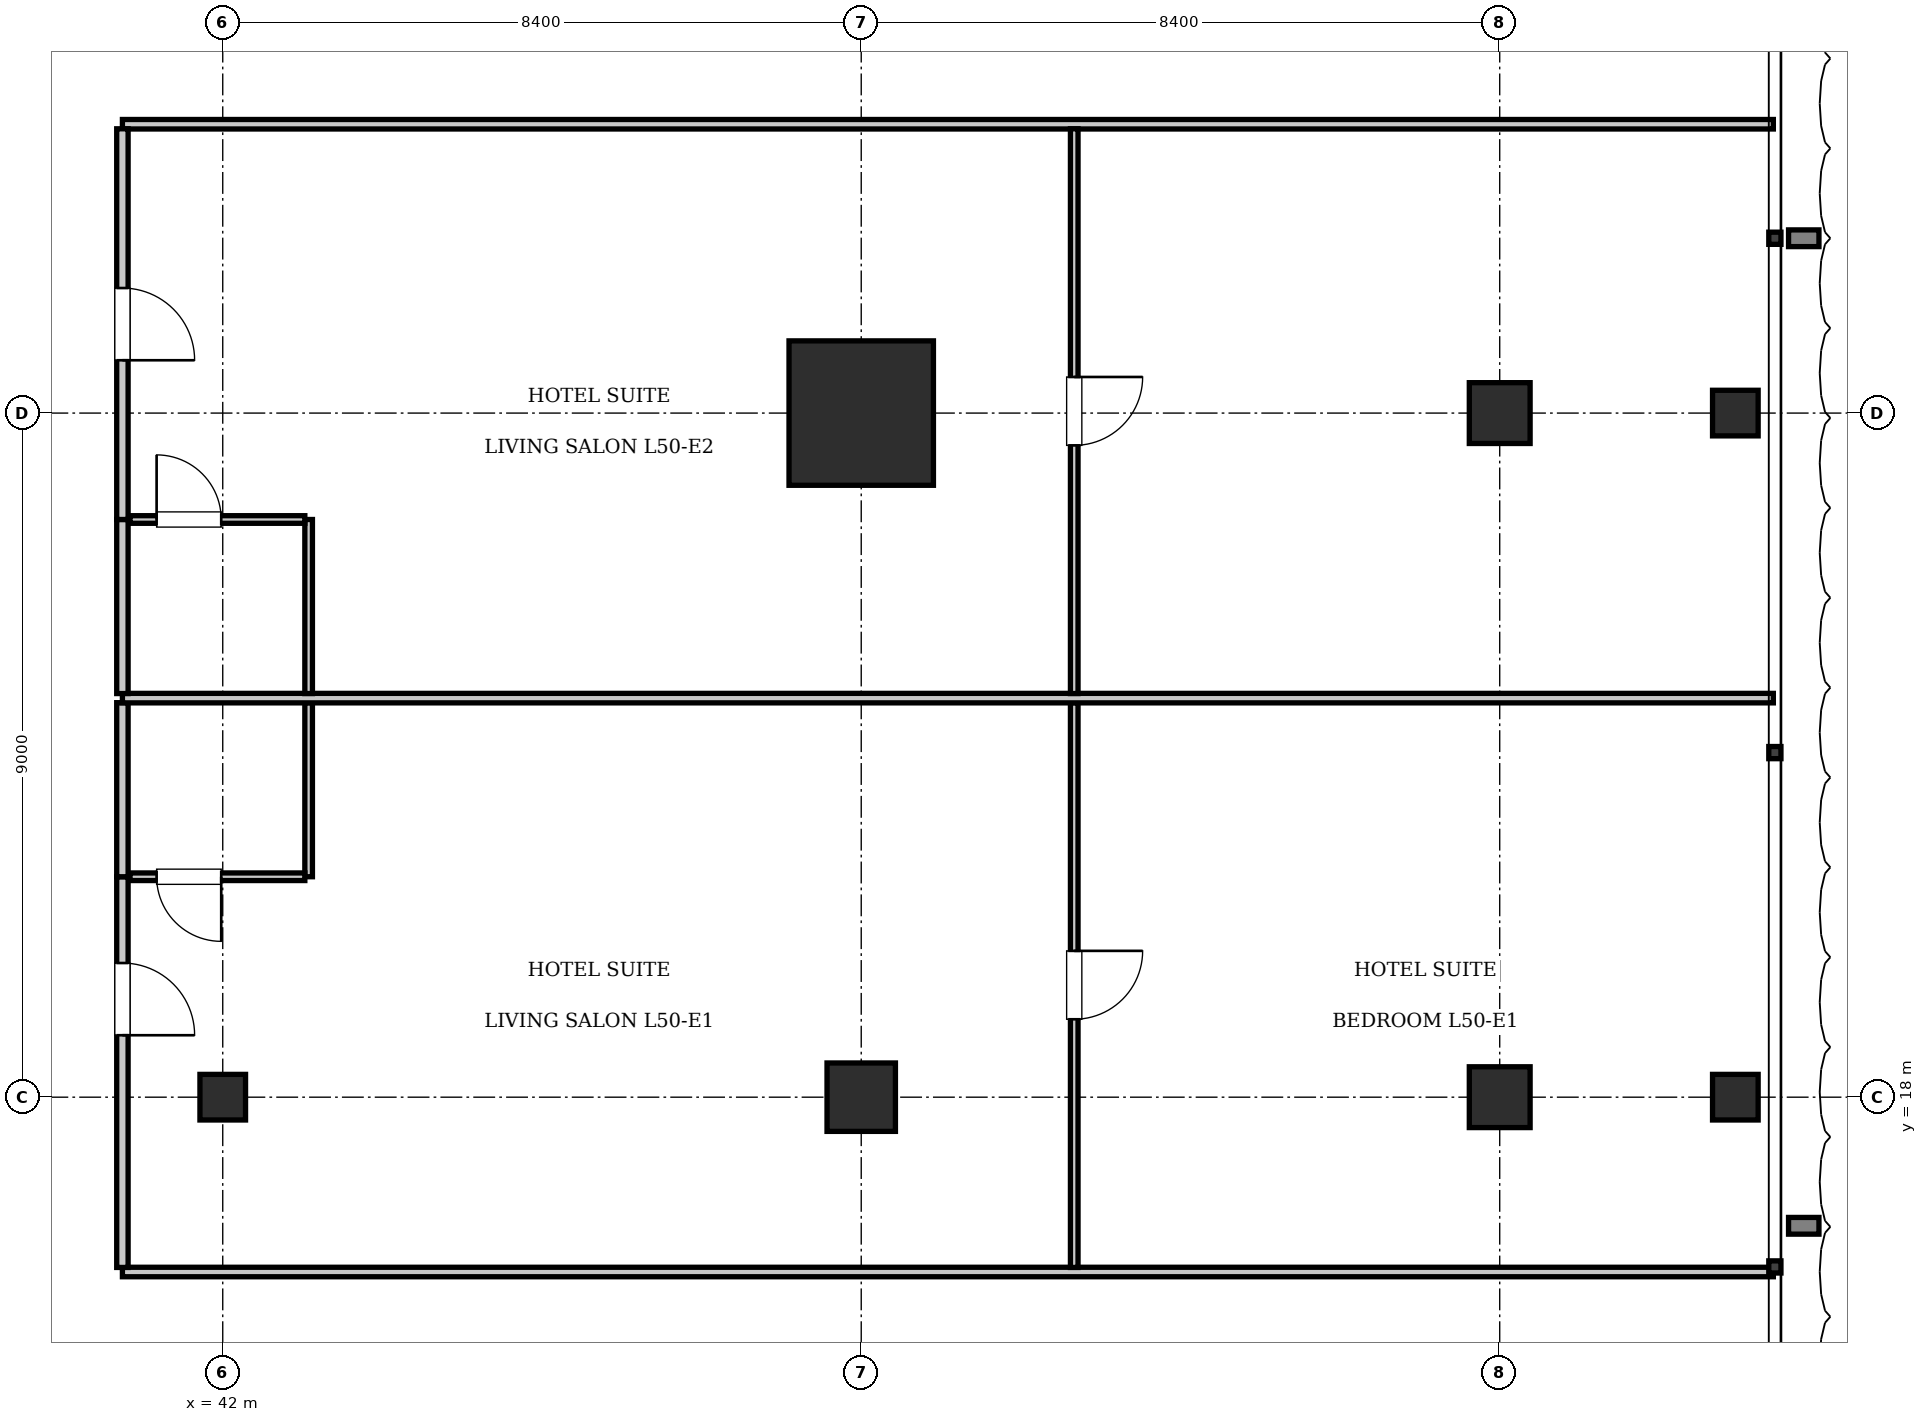
"""IFC4 building model, lengths in metres.
Left out: names, types, materials, properties, quantities, classifications, styles, units other than length and angle.
Written with IfcOpenShell. Run it as: python <this file> out.ifc"""

import sys

from ifc_helpers import new_model, si_unit, direction, frame, frame_2d, origin, origin_2d, place, context, subcontext, project, spatial, rectangle, i_section, extrude, element, fill, save


model = new_model("IFC4")
c1 = context("Model", 3, precision=1e-05, world=origin(), true_north=direction((0.0, 1.0)))
c2 = subcontext(c1, "Body", "Model", "MODEL_VIEW")
j1 = project(units=[si_unit("LENGTHUNIT", "METRE"), si_unit("PLANEANGLEUNIT", "RADIAN")], contexts=[c1])
p1 = place(None, origin())
s1 = spatial("IfcSite", under=j1, at=p1, CompositionType="ELEMENT")
p2 = place(p1, origin())
s2 = spatial("IfcBuilding", under=s1, at=p2, CompositionType="ELEMENT")
p3 = place(p2, frame((0.0, 0.0, 204.4)))
s3 = spatial("IfcBuildingStorey", under=s2, at=p3, CompositionType="ELEMENT", Elevation=204.4)
p4 = place(p3, frame((50.4, 27.0, 0.0), z_axis=(0.0, 0.0, 1.0), x_axis=(1.0, 0.0, 0.0)))
e1 = element("IfcColumn", 1, at=p4, inside=s3, PredefinedType="COLUMN", context=c2, shape_type="SweptSolid", body=[
    extrude(rectangle(XDim=1.9, YDim=1.9, at=origin_2d()), origin(), (0.0, 0.0, 1.0), 3.85),
])
p5 = place(p3, frame((50.4, 18.0, 0.0), z_axis=(0.0, 0.0, 1.0), x_axis=(1.0, 0.0, 0.0)))
e2 = element("IfcColumn", 2, at=p5, inside=s3, PredefinedType="COLUMN", context=c2, shape_type="SweptSolid", body=[
    extrude(rectangle(XDim=0.9, YDim=0.9, at=origin_2d()), origin(), (0.0, 0.0, 1.0), 3.85),
])
p6 = place(p3, frame((42.0, 18.0, 0.0), z_axis=(0.0, 0.0, 1.0), x_axis=(1.0, 0.0, 0.0)))
e3 = element("IfcColumn", 3, at=p6, inside=s3, PredefinedType="COLUMN", context=c2, shape_type="SweptSolid", body=[
    extrude(i_section(OverallWidth=0.6, OverallDepth=0.6, WebThickness=0.025, FlangeThickness=0.038, at=origin_2d()), origin(), (0.0, 0.0, 1.0), 3.85),
])
for number, where, z_axis, x_axis in (
    (4, (58.8, 18.0, 0.0), (0.0, 0.0, 1.0), (1.0, 0.0, 0.0)),
    (5, (58.8, 27.0, 0.0), (0.0, 0.0, 1.0), (1.0, 0.0, 0.0)),
):
    element("IfcColumn", number, at=place(p3, frame(where, z_axis=z_axis, x_axis=x_axis)), inside=s3, PredefinedType="COLUMN", context=c2, shape_type="SweptSolid", body=[
        extrude(rectangle(XDim=0.8, YDim=0.8, at=origin_2d()), origin(), (0.0, 0.0, 1.0), 3.85),
    ])
for number, where, z_axis, x_axis in (
    (6, (61.9, 18.0, 0.0), (0.0, 0.0, 1.0), (1.0, 0.0, 0.0)),
    (7, (61.9, 27.0, 0.0), (0.0, 0.0, 1.0), (1.0, 0.0, 0.0)),
):
    element("IfcColumn", number, at=place(p3, frame(where, z_axis=z_axis, x_axis=x_axis)), inside=s3, PredefinedType="COLUMN", context=c2, shape_type="SweptSolid", body=[
        extrude(i_section(OverallWidth=0.6, OverallDepth=0.6, WebThickness=0.025, FlangeThickness=0.038, at=origin_2d()), origin(), (0.0, 0.0, 1.0), 3.85),
    ])
for number, where, z_axis, x_axis in (
    (8, (40.68, 15.7, 0.0), (0.0, 0.0, 1.0), (1.0, 0.0, 0.0)),
    (9, (40.68, 30.8, 0.0), (0.0, 0.0, 1.0), (1.0, 0.0, 0.0)),
):
    element("IfcWall", number, at=place(p3, frame(where, z_axis=z_axis, x_axis=x_axis)), inside=s3, PredefinedType="PARTITIONING", context=c2, shape_type="SweptSolid", body=[
        extrude(rectangle(XDim=21.72, YDim=0.125, at=frame_2d((10.86, 0.0))), origin(), (0.0, 0.0, 1.0), 3.61),
    ])
p7 = place(p3, frame((40.68, 15.76, 0.0), z_axis=(0.0, 0.0, 1.0), x_axis=(0.0, 1.0, 0.0)))
e10 = element("IfcWall", 10, at=p7, inside=s3, PredefinedType="PARTITIONING", context=c2, shape_type="SweptSolid", body=[
    extrude(rectangle(XDim=5.14, YDim=0.15, at=frame_2d((2.57, 0.0))), origin(), (0.0, 0.0, 1.0), 3.61),
])
p8 = place(p7, frame((3.055, 0.0, 0.0)))
e11 = element("IfcOpeningElement", 11, at=p8, cuts=e10, PredefinedType="OPENING", context=c2, shape_type="SweptSolid", body=[
    extrude(rectangle(XDim=0.95, YDim=2.15, at=frame_2d((0.475, 1.075))), frame((0.0, 0.085, 0.0), z_axis=(0.0, -1.0, 0.0), x_axis=(1.0, 0.0, 0.0)), (0.0, 0.0, 1.0), 0.17),
])
p9 = place(p3, frame((40.68, 20.9, 0.0), z_axis=(0.0, 0.0, 1.0), x_axis=(0.0, 1.0, 0.0)))
e12 = element("IfcWall", 12, at=p9, inside=s3, PredefinedType="PARTITIONING", context=c2, shape_type="SweptSolid", body=[
    extrude(rectangle(XDim=2.29, YDim=0.15, at=frame_2d((1.145, 0.0))), origin(), (0.0, 0.0, 1.0), 3.61),
])
p10 = place(p3, frame((43.13, 20.9, 0.0), z_axis=(0.0, 0.0, 1.0), x_axis=(0.0, 1.0, 0.0)))
e13 = element("IfcWall", 13, at=p10, inside=s3, PredefinedType="PARTITIONING", context=c2, shape_type="SweptSolid", body=[
    extrude(rectangle(XDim=2.29, YDim=0.1, at=frame_2d((1.145, 0.0))), origin(), (0.0, 0.0, 1.0), 3.61),
])
p11 = place(p3, frame((40.78, 20.9, 0.0), z_axis=(0.0, 0.0, 1.0), x_axis=(1.0, 0.0, 0.0)))
e14 = element("IfcWall", 14, at=p11, inside=s3, PredefinedType="PARTITIONING", context=c2, shape_type="SweptSolid", body=[
    extrude(rectangle(XDim=2.3, YDim=0.1, at=frame_2d((1.15, 0.0))), origin(), (0.0, 0.0, 1.0), 3.61),
])
p12 = place(p11, frame((0.35, 0.0, 0.0)))
e15 = element("IfcOpeningElement", 15, at=p12, cuts=e14, PredefinedType="OPENING", context=c2, shape_type="SweptSolid", body=[
    extrude(rectangle(XDim=0.85, YDim=2.1, at=frame_2d((0.425, 1.05))), frame((0.0, 0.06, 0.0), z_axis=(0.0, -1.0, 0.0), x_axis=(1.0, 0.0, 0.0)), (0.0, 0.0, 1.0), 0.12),
])
p13 = place(p3, frame((53.202, 15.76, 0.0), z_axis=(0.0, 0.0, 1.0), x_axis=(0.0, 1.0, 0.0)))
e16 = element("IfcWall", 16, at=p13, inside=s3, PredefinedType="PARTITIONING", context=c2, shape_type="SweptSolid", body=[
    extrude(rectangle(XDim=7.43, YDim=0.1, at=frame_2d((3.715, 0.0))), origin(), (0.0, 0.0, 1.0), 3.61),
])
p14 = place(p13, frame((3.265, 0.0, 0.0)))
e17 = element("IfcOpeningElement", 17, at=p14, cuts=e16, PredefinedType="OPENING", context=c2, shape_type="SweptSolid", body=[
    extrude(rectangle(XDim=0.9, YDim=2.1, at=frame_2d((0.45, 1.05))), frame((0.0, 0.06, 0.0), z_axis=(0.0, -1.0, 0.0), x_axis=(1.0, 0.0, 0.0)), (0.0, 0.0, 1.0), 0.12),
])
p15 = place(p3, frame((40.68, 23.25, 0.0), z_axis=(0.0, 0.0, 1.0), x_axis=(1.0, 0.0, 0.0)))
e18 = element("IfcWall", 18, at=p15, inside=s3, PredefinedType="PARTITIONING", context=c2, shape_type="SweptSolid", body=[
    extrude(rectangle(XDim=21.72, YDim=0.125, at=frame_2d((10.86, 0.0))), origin(), (0.0, 0.0, 1.0), 3.61),
])
p16 = place(p3, frame((40.68, 23.31, 0.0), z_axis=(0.0, 0.0, 1.0), x_axis=(0.0, 1.0, 0.0)))
e19 = element("IfcWall", 19, at=p16, inside=s3, PredefinedType="PARTITIONING", context=c2, shape_type="SweptSolid", body=[
    extrude(rectangle(XDim=2.29, YDim=0.15, at=frame_2d((1.145, 0.0))), origin(), (0.0, 0.0, 1.0), 3.61),
])
p17 = place(p3, frame((40.68, 25.6, 0.0), z_axis=(0.0, 0.0, 1.0), x_axis=(0.0, 1.0, 0.0)))
e20 = element("IfcWall", 20, at=p17, inside=s3, PredefinedType="PARTITIONING", context=c2, shape_type="SweptSolid", body=[
    extrude(rectangle(XDim=5.14, YDim=0.15, at=frame_2d((2.57, 0.0))), origin(), (0.0, 0.0, 1.0), 3.61),
])
p18 = place(p17, frame((2.095, 0.0, 0.0)))
e21 = element("IfcOpeningElement", 21, at=p18, cuts=e20, PredefinedType="OPENING", context=c2, shape_type="SweptSolid", body=[
    extrude(rectangle(XDim=0.95, YDim=2.15, at=frame_2d((0.475, 1.075))), frame((0.0, 0.085, 0.0), z_axis=(0.0, -1.0, 0.0), x_axis=(1.0, 0.0, 0.0)), (0.0, 0.0, 1.0), 0.17),
])
p19 = place(p3, frame((43.13, 23.31, 0.0), z_axis=(0.0, 0.0, 1.0), x_axis=(0.0, 1.0, 0.0)))
e22 = element("IfcWall", 22, at=p19, inside=s3, PredefinedType="PARTITIONING", context=c2, shape_type="SweptSolid", body=[
    extrude(rectangle(XDim=2.29, YDim=0.1, at=frame_2d((1.145, 0.0))), origin(), (0.0, 0.0, 1.0), 3.61),
])
p20 = place(p3, frame((40.78, 25.6, 0.0), z_axis=(0.0, 0.0, 1.0), x_axis=(1.0, 0.0, 0.0)))
e23 = element("IfcWall", 23, at=p20, inside=s3, PredefinedType="PARTITIONING", context=c2, shape_type="SweptSolid", body=[
    extrude(rectangle(XDim=2.3, YDim=0.1, at=frame_2d((1.15, 0.0))), origin(), (0.0, 0.0, 1.0), 3.61),
])
p21 = place(p20, frame((0.35, 0.0, 0.0)))
e24 = element("IfcOpeningElement", 24, at=p21, cuts=e23, PredefinedType="OPENING", context=c2, shape_type="SweptSolid", body=[
    extrude(rectangle(XDim=0.85, YDim=2.1, at=frame_2d((0.425, 1.05))), frame((0.0, 0.06, 0.0), z_axis=(0.0, -1.0, 0.0), x_axis=(1.0, 0.0, 0.0)), (0.0, 0.0, 1.0), 0.12),
])
p22 = place(p3, frame((53.202, 23.31, 0.0), z_axis=(0.0, 0.0, 1.0), x_axis=(0.0, 1.0, 0.0)))
e25 = element("IfcWall", 25, at=p22, inside=s3, PredefinedType="PARTITIONING", context=c2, shape_type="SweptSolid", body=[
    extrude(rectangle(XDim=7.43, YDim=0.1, at=frame_2d((3.715, 0.0))), origin(), (0.0, 0.0, 1.0), 3.61),
])
p23 = place(p22, frame((3.265, 0.0, 0.0)))
e26 = element("IfcOpeningElement", 26, at=p23, cuts=e25, PredefinedType="OPENING", context=c2, shape_type="SweptSolid", body=[
    extrude(rectangle(XDim=0.9, YDim=2.1, at=frame_2d((0.45, 1.05))), frame((0.0, 0.06, 0.0), z_axis=(0.0, -1.0, 0.0), x_axis=(1.0, 0.0, 0.0)), (0.0, 0.0, 1.0), 0.12),
])
p24 = place(p12, frame((0.85, 0.0, 0.0), z_axis=(0.0, 0.0, 1.0), x_axis=(-1.0, 0.0, 0.0)))
e27 = element("IfcDoor", 27, at=p24, inside=s3, OperationType="SINGLE_SWING_LEFT", PredefinedType="DOOR", context=c2, shape_type="SweptSolid", body=[
    extrude(rectangle(XDim=0.85, YDim=2.1, at=frame_2d((0.425, 1.05))), frame((0.0, 0.025, 0.0), z_axis=(0.0, -1.0, 0.0), x_axis=(1.0, 0.0, 0.0)), (0.0, 0.0, 1.0), 0.05),
])
fill(e15, e27)
p25 = place(p8, frame((0.95, 0.0, 0.0), z_axis=(0.0, 0.0, 1.0), x_axis=(-1.0, 0.0, 0.0)))
e28 = element("IfcDoor", 28, at=p25, inside=s3, OperationType="SINGLE_SWING_RIGHT", PredefinedType="DOOR", context=c2, shape_type="SweptSolid", body=[
    extrude(rectangle(XDim=0.95, YDim=2.15, at=frame_2d((0.475, 1.075))), frame((0.0, 0.025, 0.0), z_axis=(0.0, -1.0, 0.0), x_axis=(1.0, 0.0, 0.0)), (0.0, 0.0, 1.0), 0.05),
])
fill(e11, e28)
p26 = place(p14, frame((0.9, 0.0, 0.0), z_axis=(0.0, 0.0, 1.0), x_axis=(-1.0, 0.0, 0.0)))
e29 = element("IfcDoor", 29, at=p26, inside=s3, OperationType="SINGLE_SWING_LEFT", PredefinedType="DOOR", context=c2, shape_type="SweptSolid", body=[
    extrude(rectangle(XDim=0.9, YDim=2.1, at=frame_2d((0.45, 1.05))), frame((0.0, 0.025, 0.0), z_axis=(0.0, -1.0, 0.0), x_axis=(1.0, 0.0, 0.0)), (0.0, 0.0, 1.0), 0.05),
])
fill(e17, e29)
p27 = place(p21, origin())
e30 = element("IfcDoor", 30, at=p27, inside=s3, OperationType="SINGLE_SWING_LEFT", PredefinedType="DOOR", context=c2, shape_type="SweptSolid", body=[
    extrude(rectangle(XDim=0.85, YDim=2.1, at=frame_2d((0.425, 1.05))), frame((0.0, 0.025, 0.0), z_axis=(0.0, -1.0, 0.0), x_axis=(1.0, 0.0, 0.0)), (0.0, 0.0, 1.0), 0.05),
])
fill(e24, e30)
p28 = place(p18, frame((0.95, 0.0, 0.0), z_axis=(0.0, 0.0, 1.0), x_axis=(-1.0, 0.0, 0.0)))
e31 = element("IfcDoor", 31, at=p28, inside=s3, OperationType="SINGLE_SWING_RIGHT", PredefinedType="DOOR", context=c2, shape_type="SweptSolid", body=[
    extrude(rectangle(XDim=0.95, YDim=2.15, at=frame_2d((0.475, 1.075))), frame((0.0, 0.025, 0.0), z_axis=(0.0, -1.0, 0.0), x_axis=(1.0, 0.0, 0.0)), (0.0, 0.0, 1.0), 0.05),
])
fill(e21, e31)
p29 = place(p23, frame((0.9, 0.0, 0.0), z_axis=(0.0, 0.0, 1.0), x_axis=(-1.0, 0.0, 0.0)))
e32 = element("IfcDoor", 32, at=p29, inside=s3, OperationType="SINGLE_SWING_LEFT", PredefinedType="DOOR", context=c2, shape_type="SweptSolid", body=[
    extrude(rectangle(XDim=0.9, YDim=2.1, at=frame_2d((0.45, 1.05))), frame((0.0, 0.025, 0.0), z_axis=(0.0, -1.0, 0.0), x_axis=(1.0, 0.0, 0.0)), (0.0, 0.0, 1.0), 0.05),
])
fill(e26, e32)
save(model, sys.argv[1])
